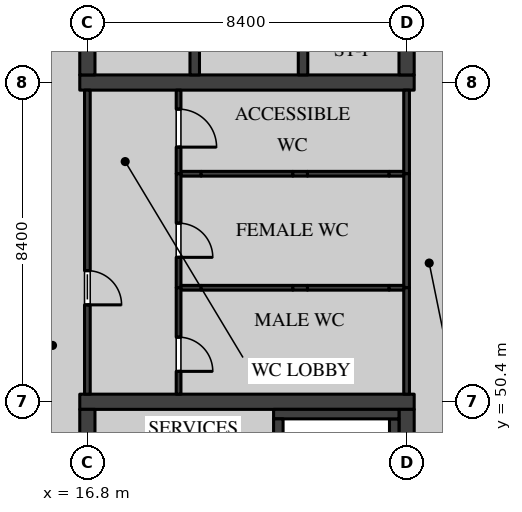
"""IFC4 building model, lengths in metres.
Left out: names, types, materials, properties, quantities, classifications, styles, units other than length and angle.
Written with IfcOpenShell. Run it as: python <this file> out.ifc"""

import sys

from ifc_helpers import new_model, si_unit, direction, frame, frame_2d, origin, place, context, subcontext, project, spatial, rectangle, extrude, element, fill, save


model = new_model("IFC4")
c1 = context("Model", 3, precision=1e-05, world=origin(), true_north=direction((0.0, 1.0)))
c2 = subcontext(c1, "Body", "Model", "MODEL_VIEW")
j1 = project(units=[si_unit("LENGTHUNIT", "METRE"), si_unit("PLANEANGLEUNIT", "RADIAN")], contexts=[c1])
p1 = place(None, origin())
s1 = spatial("IfcSite", under=j1, at=p1, CompositionType="ELEMENT")
p2 = place(p1, origin())
s2 = spatial("IfcBuilding", under=s1, at=p2, CompositionType="ELEMENT")
p3 = place(p2, frame((0.0, 0.0, 14.4)))
s3 = spatial("IfcBuildingStorey", under=s2, at=p3, CompositionType="ELEMENT", Elevation=14.4)
p4 = place(p3, frame((16.6, 50.4, 0.0), z_axis=(0.0, 0.0, 1.0), x_axis=(1.0, 0.0, 0.0)))
e1 = element("IfcWall", 1, at=p4, inside=s3, PredefinedType="SHEAR", context=c2, shape_type="SweptSolid", body=[
    extrude(rectangle(XDim=8.8, YDim=0.4, at=frame_2d((4.4, 0.0))), origin(), (0.0, 0.0, 1.0), 4.37),
])
p5 = place(p3, frame((16.8, 42.2, 0.0), z_axis=(0.0, 0.0, 1.0), x_axis=(0.0, 1.0, 0.0)))
e2 = element("IfcWall", 2, at=p5, inside=s3, PredefinedType="SHEAR", context=c2, shape_type="SweptSolid", body=[
    extrude(rectangle(XDim=8.0, YDim=0.4, at=frame_2d((4.0, 0.0))), origin(), (0.0, 0.0, 1.0), 4.37),
])
p6 = place(p5, frame((3.55, 0.0, 0.0)))
e3 = element("IfcOpeningElement", 3, at=p6, cuts=e2, PredefinedType="OPENING", context=c2, shape_type="SweptSolid", body=[
    extrude(rectangle(XDim=1.2, YDim=2.1, at=frame_2d((0.6, 1.05))), frame((0.0, 0.21, 0.0), z_axis=(0.0, -1.0, 0.0), x_axis=(1.0, 0.0, 0.0)), (0.0, 0.0, 1.0), 0.42),
])
p7 = place(p5, frame((0.8, 0.0, 0.0)))
e4 = element("IfcOpeningElement", 4, at=p7, cuts=e2, PredefinedType="OPENING", context=c2, shape_type="SweptSolid", body=[
    extrude(rectangle(XDim=1.2, YDim=2.1, at=frame_2d((0.6, 1.05))), frame((0.0, 0.21, 0.0), z_axis=(0.0, -1.0, 0.0), x_axis=(1.0, 0.0, 0.0)), (0.0, 0.0, 1.0), 0.42),
])
p8 = place(p3, frame((25.2, 42.2, 0.0), z_axis=(0.0, 0.0, 1.0), x_axis=(0.0, 1.0, 0.0)))
e5 = element("IfcWall", 5, at=p8, inside=s3, PredefinedType="SHEAR", context=c2, shape_type="SweptSolid", body=[
    extrude(rectangle(XDim=8.0, YDim=0.4, at=frame_2d((4.0, 0.0))), origin(), (0.0, 0.0, 1.0), 4.37),
])
p9 = place(p8, frame((3.55, 0.0, 0.0)))
e6 = element("IfcOpeningElement", 6, at=p9, cuts=e5, PredefinedType="OPENING", context=c2, shape_type="SweptSolid", body=[
    extrude(rectangle(XDim=1.2, YDim=2.1, at=frame_2d((0.6, 1.05))), frame((0.0, 0.21, 0.0), z_axis=(0.0, -1.0, 0.0), x_axis=(1.0, 0.0, 0.0)), (0.0, 0.0, 1.0), 0.42),
])
p10 = place(p3, frame((16.6, 58.8, 0.0), z_axis=(0.0, 0.0, 1.0), x_axis=(1.0, 0.0, 0.0)))
e7 = element("IfcWall", 7, at=p10, inside=s3, PredefinedType="SHEAR", context=c2, shape_type="SweptSolid", body=[
    extrude(rectangle(XDim=8.8, YDim=0.4, at=frame_2d((4.4, 0.0))), origin(), (0.0, 0.0, 1.0), 4.37),
])
p11 = place(p3, frame((16.8, 59.0, 0.0), z_axis=(0.0, 0.0, 1.0), x_axis=(0.0, 1.0, 0.0)))
e8 = element("IfcWall", 8, at=p11, inside=s3, PredefinedType="SHEAR", context=c2, shape_type="SweptSolid", body=[
    extrude(rectangle(XDim=8.0, YDim=0.4, at=frame_2d((4.0, 0.0))), origin(), (0.0, 0.0, 1.0), 4.37),
])
p12 = place(p11, frame((2.925, 0.0, 0.0)))
e9 = element("IfcOpeningElement", 9, at=p12, cuts=e8, PredefinedType="OPENING", context=c2, shape_type="SweptSolid", body=[
    extrude(rectangle(XDim=1.2, YDim=2.1, at=frame_2d((0.6, 1.05))), frame((0.0, 0.21, 0.0), z_axis=(0.0, -1.0, 0.0), x_axis=(1.0, 0.0, 0.0)), (0.0, 0.0, 1.0), 0.42),
])
p13 = place(p3, frame((25.2, 59.0, 0.0), z_axis=(0.0, 0.0, 1.0), x_axis=(0.0, 1.0, 0.0)))
e10 = element("IfcWall", 10, at=p13, inside=s3, PredefinedType="SHEAR", context=c2, shape_type="SweptSolid", body=[
    extrude(rectangle(XDim=8.0, YDim=0.4, at=frame_2d((4.0, 0.0))), origin(), (0.0, 0.0, 1.0), 4.37),
])
p14 = place(p13, frame((2.925, 0.0, 0.0)))
e11 = element("IfcOpeningElement", 11, at=p14, cuts=e10, PredefinedType="OPENING", context=c2, shape_type="SweptSolid", body=[
    extrude(rectangle(XDim=1.2, YDim=2.1, at=frame_2d((0.6, 1.05))), frame((0.0, 0.21, 0.0), z_axis=(0.0, -1.0, 0.0), x_axis=(1.0, 0.0, 0.0)), (0.0, 0.0, 1.0), 0.42),
])
p15 = place(p3, frame((22.475, 61.8, 0.0), z_axis=(0.0, 0.0, 1.0), x_axis=(0.0, -1.0, 0.0)))
e12 = element("IfcWall", 12, at=p15, inside=s3, PredefinedType="SOLIDWALL", context=c2, shape_type="SweptSolid", body=[
    extrude(rectangle(XDim=2.8, YDim=0.25, at=frame_2d((1.4, 0.0))), origin(), (0.0, 0.0, 1.0), 4.37),
])
p16 = place(p3, frame((19.625, 61.55, 0.0), z_axis=(0.0, 0.0, 1.0), x_axis=(0.0, -1.0, 0.0)))
e13 = element("IfcWall", 13, at=p16, inside=s3, PredefinedType="SOLIDWALL", context=c2, shape_type="SweptSolid", body=[
    extrude(rectangle(XDim=2.55, YDim=0.25, at=frame_2d((1.275, 0.0))), origin(), (0.0, 0.0, 1.0), 4.37),
])
p17 = place(p3, frame((24.875, 47.65, 0.0), z_axis=(0.0, 0.0, 1.0), x_axis=(0.0, 1.0, 0.0)))
e14 = element("IfcWall", 14, at=p17, inside=s3, PredefinedType="SOLIDWALL", context=c2, shape_type="SweptSolid", body=[
    extrude(rectangle(XDim=2.3, YDim=0.25, at=frame_2d((1.15, 0.0))), origin(), (0.0, 0.0, 1.0), 4.37),
])
p18 = place(p3, frame((21.7, 50.075, 0.0), z_axis=(0.0, 0.0, 1.0), x_axis=(1.0, 0.0, 0.0)))
e15 = element("IfcWall", 15, at=p18, inside=s3, PredefinedType="SOLIDWALL", context=c2, shape_type="SweptSolid", body=[
    extrude(rectangle(XDim=3.3, YDim=0.25, at=frame_2d((1.65, 0.0))), origin(), (0.0, 0.0, 1.0), 4.37),
])
p19 = place(p3, frame((21.825, 47.65, 0.0), z_axis=(0.0, 0.0, 1.0), x_axis=(0.0, 1.0, 0.0)))
e16 = element("IfcWall", 16, at=p19, inside=s3, PredefinedType="SOLIDWALL", context=c2, shape_type="SweptSolid", body=[
    extrude(rectangle(XDim=2.3, YDim=0.25, at=frame_2d((1.15, 0.0))), origin(), (0.0, 0.0, 1.0), 4.37),
])
p20 = place(p3, frame((25.2, 56.4, 0.0), z_axis=(0.0, 0.0, 1.0), x_axis=(0.0, 1.0, 0.0)))
e17 = element("IfcWall", 17, at=p20, inside=s3, PredefinedType="PARTITIONING", context=c2, shape_type="SweptSolid", body=[
    extrude(rectangle(XDim=2.2, YDim=0.15, at=frame_2d((1.1, 0.0))), origin(), (0.0, 0.0, 1.0), 3.746),
])
p21 = place(p3, frame((25.2, 53.4, 0.0), z_axis=(0.0, 0.0, 1.0), x_axis=(0.0, 1.0, 0.0)))
e18 = element("IfcWall", 18, at=p21, inside=s3, PredefinedType="PARTITIONING", context=c2, shape_type="SweptSolid", body=[
    extrude(rectangle(XDim=3.0, YDim=0.15, at=frame_2d((1.5, 0.0))), origin(), (0.0, 0.0, 1.0), 3.746),
])
p22 = place(p3, frame((25.2, 50.6, 0.0), z_axis=(0.0, 0.0, 1.0), x_axis=(0.0, 1.0, 0.0)))
e19 = element("IfcWall", 19, at=p22, inside=s3, PredefinedType="PARTITIONING", context=c2, shape_type="SweptSolid", body=[
    extrude(rectangle(XDim=2.8, YDim=0.15, at=frame_2d((1.4, 0.0))), origin(), (0.0, 0.0, 1.0), 3.746),
])
p23 = place(p3, frame((16.8, 50.6, 0.0), z_axis=(0.0, 0.0, 1.0), x_axis=(0.0, 1.0, 0.0)))
e20 = element("IfcWall", 20, at=p23, inside=s3, PredefinedType="PARTITIONING", context=c2, shape_type="SweptSolid", body=[
    extrude(rectangle(XDim=8.0, YDim=0.15, at=frame_2d((4.0, 0.0))), origin(), (0.0, 0.0, 1.0), 3.746),
])
p24 = place(p23, frame((2.35, 0.0, 0.0)))
e21 = element("IfcOpeningElement", 21, at=p24, cuts=e20, PredefinedType="OPENING", context=c2, shape_type="SweptSolid", body=[
    extrude(rectangle(XDim=0.9, YDim=2.1, at=frame_2d((0.45, 1.05))), frame((0.0, 0.085, 0.0), z_axis=(0.0, -1.0, 0.0), x_axis=(1.0, 0.0, 0.0)), (0.0, 0.0, 1.0), 0.17),
])
p25 = place(p3, frame((19.262, 56.4, 0.0), z_axis=(0.0, 0.0, 1.0), x_axis=(1.0, 0.0, 0.0)))
e22 = element("IfcWall", 22, at=p25, inside=s3, PredefinedType="PARTITIONING", context=c2, shape_type="SweptSolid", body=[
    extrude(rectangle(XDim=0.531, YDim=0.125, at=frame_2d((0.266, 0.0))), origin(), (0.0, 0.0, 1.0), 3.895),
])
p26 = place(p3, frame((19.793, 56.4, 0.0), z_axis=(0.0, 0.0, 1.0), x_axis=(1.0, 0.0, 0.0)))
e23 = element("IfcWall", 23, at=p26, inside=s3, PredefinedType="PARTITIONING", context=c2, shape_type="SweptSolid", body=[
    extrude(rectangle(XDim=2.414, YDim=0.125, at=frame_2d((1.207, 0.0))), origin(), (0.0, 0.0, 1.0), 4.37),
])
p27 = place(p3, frame((22.207, 56.4, 0.0), z_axis=(0.0, 0.0, 1.0), x_axis=(1.0, 0.0, 0.0)))
e24 = element("IfcWall", 24, at=p27, inside=s3, PredefinedType="PARTITIONING", context=c2, shape_type="SweptSolid", body=[
    extrude(rectangle(XDim=0.385, YDim=0.125, at=frame_2d((0.192, 0.0))), origin(), (0.0, 0.0, 1.0), 3.895),
])
p28 = place(p3, frame((22.592, 56.4, 0.0), z_axis=(0.0, 0.0, 1.0), x_axis=(1.0, 0.0, 0.0)))
e25 = element("IfcWall", 25, at=p28, inside=s3, PredefinedType="PARTITIONING", context=c2, shape_type="SweptSolid", body=[
    extrude(rectangle(XDim=2.148, YDim=0.125, at=frame_2d((1.074, 0.0))), origin(), (0.0, 0.0, 1.0), 4.37),
])
p29 = place(p3, frame((24.74, 56.4, 0.0), z_axis=(0.0, 0.0, 1.0), x_axis=(1.0, 0.0, 0.0)))
e26 = element("IfcWall", 26, at=p29, inside=s3, PredefinedType="PARTITIONING", context=c2, shape_type="SweptSolid", body=[
    extrude(rectangle(XDim=0.385, YDim=0.125, at=frame_2d((0.192, 0.0))), origin(), (0.0, 0.0, 1.0), 3.746),
])
p30 = place(p3, frame((19.2, 56.4, 0.0), z_axis=(0.0, 0.0, 1.0), x_axis=(0.0, 1.0, 0.0)))
e27 = element("IfcWall", 27, at=p30, inside=s3, PredefinedType="PARTITIONING", context=c2, shape_type="SweptSolid", body=[
    extrude(rectangle(XDim=2.2, YDim=0.125, at=frame_2d((1.1, 0.0))), origin(), (0.0, 0.0, 1.0), 4.37),
])
p31 = place(p30, frame((0.7, 0.0, 0.0)))
e28 = element("IfcOpeningElement", 28, at=p31, cuts=e27, PredefinedType="OPENING", context=c2, shape_type="SweptSolid", body=[
    extrude(rectangle(XDim=1.0, YDim=2.1, at=frame_2d((0.5, 1.05))), frame((0.0, 0.073, 0.0), z_axis=(0.0, -1.0, 0.0), x_axis=(1.0, 0.0, 0.0)), (0.0, 0.0, 1.0), 0.145),
])
p32 = place(p3, frame((19.2, 53.4, 0.0), z_axis=(0.0, 0.0, 1.0), x_axis=(0.0, 1.0, 0.0)))
e29 = element("IfcWall", 29, at=p32, inside=s3, PredefinedType="PARTITIONING", context=c2, shape_type="SweptSolid", body=[
    extrude(rectangle(XDim=3.0, YDim=0.125, at=frame_2d((1.5, 0.0))), origin(), (0.0, 0.0, 1.0), 4.37),
])
p33 = place(p32, frame((0.8, 0.0, 0.0)))
e30 = element("IfcOpeningElement", 30, at=p33, cuts=e29, PredefinedType="OPENING", context=c2, shape_type="SweptSolid", body=[
    extrude(rectangle(XDim=0.9, YDim=2.1, at=frame_2d((0.45, 1.05))), frame((0.0, 0.073, 0.0), z_axis=(0.0, -1.0, 0.0), x_axis=(1.0, 0.0, 0.0)), (0.0, 0.0, 1.0), 0.145),
])
p34 = place(p3, frame((19.262, 53.4, 0.0), z_axis=(0.0, 0.0, 1.0), x_axis=(1.0, 0.0, 0.0)))
e31 = element("IfcWall", 31, at=p34, inside=s3, PredefinedType="PARTITIONING", context=c2, shape_type="SweptSolid", body=[
    extrude(rectangle(XDim=0.531, YDim=0.125, at=frame_2d((0.266, 0.0))), origin(), (0.0, 0.0, 1.0), 3.895),
])
p35 = place(p3, frame((19.793, 53.4, 0.0), z_axis=(0.0, 0.0, 1.0), x_axis=(1.0, 0.0, 0.0)))
e32 = element("IfcWall", 32, at=p35, inside=s3, PredefinedType="PARTITIONING", context=c2, shape_type="SweptSolid", body=[
    extrude(rectangle(XDim=2.414, YDim=0.125, at=frame_2d((1.207, 0.0))), origin(), (0.0, 0.0, 1.0), 4.37),
])
p36 = place(p3, frame((22.207, 53.4, 0.0), z_axis=(0.0, 0.0, 1.0), x_axis=(1.0, 0.0, 0.0)))
e33 = element("IfcWall", 33, at=p36, inside=s3, PredefinedType="PARTITIONING", context=c2, shape_type="SweptSolid", body=[
    extrude(rectangle(XDim=0.385, YDim=0.125, at=frame_2d((0.192, 0.0))), origin(), (0.0, 0.0, 1.0), 3.895),
])
p37 = place(p3, frame((22.592, 53.4, 0.0), z_axis=(0.0, 0.0, 1.0), x_axis=(1.0, 0.0, 0.0)))
e34 = element("IfcWall", 34, at=p37, inside=s3, PredefinedType="PARTITIONING", context=c2, shape_type="SweptSolid", body=[
    extrude(rectangle(XDim=2.148, YDim=0.125, at=frame_2d((1.074, 0.0))), origin(), (0.0, 0.0, 1.0), 4.37),
])
p38 = place(p3, frame((24.74, 53.4, 0.0), z_axis=(0.0, 0.0, 1.0), x_axis=(1.0, 0.0, 0.0)))
e35 = element("IfcWall", 35, at=p38, inside=s3, PredefinedType="PARTITIONING", context=c2, shape_type="SweptSolid", body=[
    extrude(rectangle(XDim=0.385, YDim=0.125, at=frame_2d((0.192, 0.0))), origin(), (0.0, 0.0, 1.0), 3.746),
])
p39 = place(p3, frame((19.2, 50.6, 0.0), z_axis=(0.0, 0.0, 1.0), x_axis=(0.0, 1.0, 0.0)))
e36 = element("IfcWall", 36, at=p39, inside=s3, PredefinedType="PARTITIONING", context=c2, shape_type="SweptSolid", body=[
    extrude(rectangle(XDim=2.8, YDim=0.125, at=frame_2d((1.4, 0.0))), origin(), (0.0, 0.0, 1.0), 4.37),
])
p40 = place(p39, frame((0.6, 0.0, 0.0)))
e37 = element("IfcOpeningElement", 37, at=p40, cuts=e36, PredefinedType="OPENING", context=c2, shape_type="SweptSolid", body=[
    extrude(rectangle(XDim=0.9, YDim=2.1, at=frame_2d((0.45, 1.05))), frame((0.0, 0.073, 0.0), z_axis=(0.0, -1.0, 0.0), x_axis=(1.0, 0.0, 0.0)), (0.0, 0.0, 1.0), 0.145),
])
p41 = place(p31, frame((1.0, 0.0, 0.0), z_axis=(0.0, 0.0, 1.0), x_axis=(-1.0, 0.0, 0.0)))
e38 = element("IfcDoor", 38, at=p41, inside=s3, OperationType="SINGLE_SWING_LEFT", PredefinedType="DOOR", context=c2, shape_type="SweptSolid", body=[
    extrude(rectangle(XDim=1.0, YDim=2.1, at=frame_2d((0.5, 1.05))), frame((0.0, 0.02, 0.0), z_axis=(0.0, -1.0, 0.0), x_axis=(1.0, 0.0, 0.0)), (0.0, 0.0, 1.0), 0.04),
])
fill(e28, e38)
p42 = place(p33, frame((0.9, 0.0, 0.0), z_axis=(0.0, 0.0, 1.0), x_axis=(-1.0, 0.0, 0.0)))
e39 = element("IfcDoor", 39, at=p42, inside=s3, OperationType="SINGLE_SWING_LEFT", PredefinedType="DOOR", context=c2, shape_type="SweptSolid", body=[
    extrude(rectangle(XDim=0.9, YDim=2.1, at=frame_2d((0.45, 1.05))), frame((0.0, 0.02, 0.0), z_axis=(0.0, -1.0, 0.0), x_axis=(1.0, 0.0, 0.0)), (0.0, 0.0, 1.0), 0.04),
])
fill(e30, e39)
p43 = place(p24, frame((0.9, 0.0, 0.0), z_axis=(0.0, 0.0, 1.0), x_axis=(-1.0, 0.0, 0.0)))
e40 = element("IfcDoor", 40, at=p43, inside=s3, OperationType="SINGLE_SWING_LEFT", PredefinedType="DOOR", context=c2, shape_type="SweptSolid", body=[
    extrude(rectangle(XDim=0.9, YDim=2.1, at=frame_2d((0.45, 1.05))), frame((0.0, 0.025, 0.0), z_axis=(0.0, -1.0, 0.0), x_axis=(1.0, 0.0, 0.0)), (0.0, 0.0, 1.0), 0.05),
])
fill(e21, e40)
p44 = place(p40, frame((0.9, 0.0, 0.0), z_axis=(0.0, 0.0, 1.0), x_axis=(-1.0, 0.0, 0.0)))
e41 = element("IfcDoor", 41, at=p44, inside=s3, OperationType="SINGLE_SWING_LEFT", PredefinedType="DOOR", context=c2, shape_type="SweptSolid", body=[
    extrude(rectangle(XDim=0.9, YDim=2.1, at=frame_2d((0.45, 1.05))), frame((0.0, 0.02, 0.0), z_axis=(0.0, -1.0, 0.0), x_axis=(1.0, 0.0, 0.0)), (0.0, 0.0, 1.0), 0.04),
])
fill(e37, e41)
save(model, sys.argv[1])
